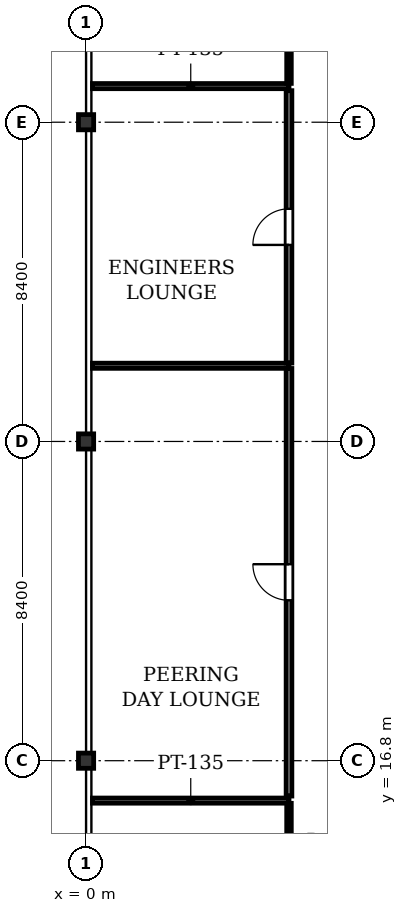
"""IFC4 building model, lengths in metres.
Left out: names, types, materials, properties, quantities, classifications, styles, units other than length and angle.
Written with IfcOpenShell. Run it as: python <this file> out.ifc"""

import sys

from ifc_helpers import new_model, si_unit, direction, frame, frame_2d, origin, origin_2d, place, context, subcontext, project, spatial, rectangle, i_section, extrude, element, fill, save


model = new_model("IFC4")
c1 = context("Model", 3, precision=1e-05, world=origin(), true_north=direction((0.0, 1.0)))
c2 = subcontext(c1, "Body", "Model", "MODEL_VIEW")
j1 = project(units=[si_unit("LENGTHUNIT", "METRE"), si_unit("PLANEANGLEUNIT", "RADIAN")], contexts=[c1])
p1 = place(None, origin())
s1 = spatial("IfcSite", under=j1, at=p1, CompositionType="ELEMENT")
p2 = place(p1, origin())
s2 = spatial("IfcBuilding", under=s1, at=p2, CompositionType="ELEMENT")
p3 = place(p2, frame((0.0, 0.0, 129.5)))
s3 = spatial("IfcBuildingStorey", under=s2, at=p3, CompositionType="ELEMENT", Elevation=129.5)
for number, where, z_axis, x_axis in (
    (1, (0.0, 16.8, 0.0), (0.0, 0.0, 1.0), (1.0, 0.0, 0.0)),
    (2, (0.0, 25.2, 0.0), (0.0, 0.0, 1.0), (1.0, 0.0, 0.0)),
    (3, (0.0, 33.6, 0.0), (0.0, 0.0, 1.0), (1.0, 0.0, 0.0)),
):
    element("IfcColumn", number, at=place(p3, frame(where, z_axis=z_axis, x_axis=x_axis)), inside=s3, PredefinedType="COLUMN", context=c2, shape_type="SweptSolid", body=[
        extrude(i_section(OverallWidth=0.4, OverallDepth=0.4, WebThickness=0.025, FlangeThickness=0.04, at=origin_2d()), origin(), (0.0, 0.0, 1.0), 4.1),
    ])
p4 = place(p3, frame((5.34, 15.75, 0.0), z_axis=(0.0, 0.0, 1.0), x_axis=(-1.0, 0.0, 0.0)))
e4 = element("IfcWall", 4, at=p4, inside=s3, PredefinedType="PARTITIONING", context=c2, shape_type="SweptSolid", body=[
    extrude(rectangle(XDim=5.171, YDim=0.135, at=frame_2d((2.585, 0.0))), origin(), (0.0, 0.0, 1.0), 3.469),
])
p5 = place(p3, frame((5.34, 12.671, 0.0), z_axis=(0.0, 0.0, 1.0), x_axis=(0.0, 1.0, 0.0)))
e5 = element("IfcWall", 5, at=p5, inside=s3, PredefinedType="PARTITIONING", context=c2, shape_type="SweptSolid", body=[
    extrude(rectangle(XDim=3.007, YDim=0.12, at=frame_2d((1.503, 0.0))), origin(), (0.0, 0.0, 1.0), 3.825),
])
p6 = place(p5, frame((1.043, 0.0, 0.0)))
e6 = element("IfcOpeningElement", 6, at=p6, cuts=e5, PredefinedType="OPENING", context=c2, shape_type="SweptSolid", body=[
    extrude(rectangle(XDim=0.92, YDim=2.1, at=frame_2d((0.46, 1.05))), frame((0.0, 0.07, 0.0), z_axis=(0.0, -1.0, 0.0), x_axis=(1.0, 0.0, 0.0)), (0.0, 0.0, 1.0), 0.14),
])
p7 = place(p3, frame((0.169, 34.55, 0.0), z_axis=(0.0, 0.0, 1.0), x_axis=(1.0, 0.0, 0.0)))
e7 = element("IfcWall", 7, at=p7, inside=s3, PredefinedType="PARTITIONING", context=c2, shape_type="SweptSolid", body=[
    extrude(rectangle(XDim=5.171, YDim=0.135, at=frame_2d((2.585, 0.0))), origin(), (0.0, 0.0, 1.0), 3.469),
])
p8 = place(p3, frame((5.34, 34.622, 0.0), z_axis=(0.0, 0.0, 1.0), x_axis=(0.0, 1.0, 0.0)))
e8 = element("IfcWall", 8, at=p8, inside=s3, PredefinedType="PARTITIONING", context=c2, shape_type="SweptSolid", body=[
    extrude(rectangle(XDim=2.957, YDim=0.12, at=frame_2d((1.479, 0.0))), origin(), (0.0, 0.0, 1.0), 3.825),
])
p9 = place(p8, frame((1.019, 0.0, 0.0)))
e9 = element("IfcOpeningElement", 9, at=p9, cuts=e8, PredefinedType="OPENING", context=c2, shape_type="SweptSolid", body=[
    extrude(rectangle(XDim=0.92, YDim=2.1, at=frame_2d((0.46, 1.05))), frame((0.0, 0.07, 0.0), z_axis=(0.0, -1.0, 0.0), x_axis=(1.0, 0.0, 0.0)), (0.0, 0.0, 1.0), 0.14),
])
p10 = place(p3, frame((0.169, 27.192, 0.0), z_axis=(0.0, 0.0, 1.0), x_axis=(1.0, 0.0, 0.0)))
e10 = element("IfcWall", 10, at=p10, inside=s3, PredefinedType="PARTITIONING", context=c2, shape_type="SweptSolid", body=[
    extrude(rectangle(XDim=5.171, YDim=0.135, at=frame_2d((2.585, 0.0))), origin(), (0.0, 0.0, 1.0), 3.469),
])
p11 = place(p3, frame((5.34, 27.263, 0.0), z_axis=(0.0, 0.0, 1.0), x_axis=(0.0, 1.0, 0.0)))
e11 = element("IfcWall", 11, at=p11, inside=s3, PredefinedType="PARTITIONING", context=c2, shape_type="SweptSolid", body=[
    extrude(rectangle(XDim=7.167, YDim=0.15, at=frame_2d((3.583, 0.0))), origin(), (0.0, 0.0, 1.0), 3.292),
])
p12 = place(p11, frame((3.108, 0.0, 0.0)))
e12 = element("IfcOpeningElement", 12, at=p12, cuts=e11, PredefinedType="OPENING", context=c2, shape_type="SweptSolid", body=[
    extrude(rectangle(XDim=0.95, YDim=2.15, at=frame_2d((0.475, 1.075))), frame((0.0, 0.085, 0.0), z_axis=(0.0, -1.0, 0.0), x_axis=(1.0, 0.0, 0.0)), (0.0, 0.0, 1.0), 0.17),
])
p13 = place(p3, frame((5.34, 15.87, 0.0), z_axis=(0.0, 0.0, 1.0), x_axis=(0.0, 1.0, 0.0)))
e13 = element("IfcWall", 13, at=p13, inside=s3, PredefinedType="PARTITIONING", context=c2, shape_type="SweptSolid", body=[
    extrude(rectangle(XDim=11.25, YDim=0.15, at=frame_2d((5.625, 0.0))), origin(), (0.0, 0.0, 1.0), 3.292),
])
p14 = place(p13, frame((5.15, 0.0, 0.0)))
e14 = element("IfcOpeningElement", 14, at=p14, cuts=e13, PredefinedType="OPENING", context=c2, shape_type="SweptSolid", body=[
    extrude(rectangle(XDim=0.95, YDim=2.15, at=frame_2d((0.475, 1.075))), frame((0.0, 0.085, 0.0), z_axis=(0.0, -1.0, 0.0), x_axis=(1.0, 0.0, 0.0)), (0.0, 0.0, 1.0), 0.17),
])
p15 = place(p12, origin())
e15 = element("IfcDoor", 15, at=p15, inside=s3, OperationType="SINGLE_SWING_LEFT", PredefinedType="DOOR", context=c2, shape_type="SweptSolid", body=[
    extrude(rectangle(XDim=0.95, YDim=2.15, at=frame_2d((0.475, 1.075))), frame((0.0, 0.025, 0.0), z_axis=(0.0, -1.0, 0.0), x_axis=(1.0, 0.0, 0.0)), (0.0, 0.0, 1.0), 0.05),
])
fill(e12, e15)
p16 = place(p14, origin())
e16 = element("IfcDoor", 16, at=p16, inside=s3, OperationType="SINGLE_SWING_RIGHT", PredefinedType="DOOR", context=c2, shape_type="SweptSolid", body=[
    extrude(rectangle(XDim=0.95, YDim=2.15, at=frame_2d((0.475, 1.075))), frame((0.0, 0.025, 0.0), z_axis=(0.0, -1.0, 0.0), x_axis=(1.0, 0.0, 0.0)), (0.0, 0.0, 1.0), 0.05),
])
fill(e14, e16)
save(model, sys.argv[1])
